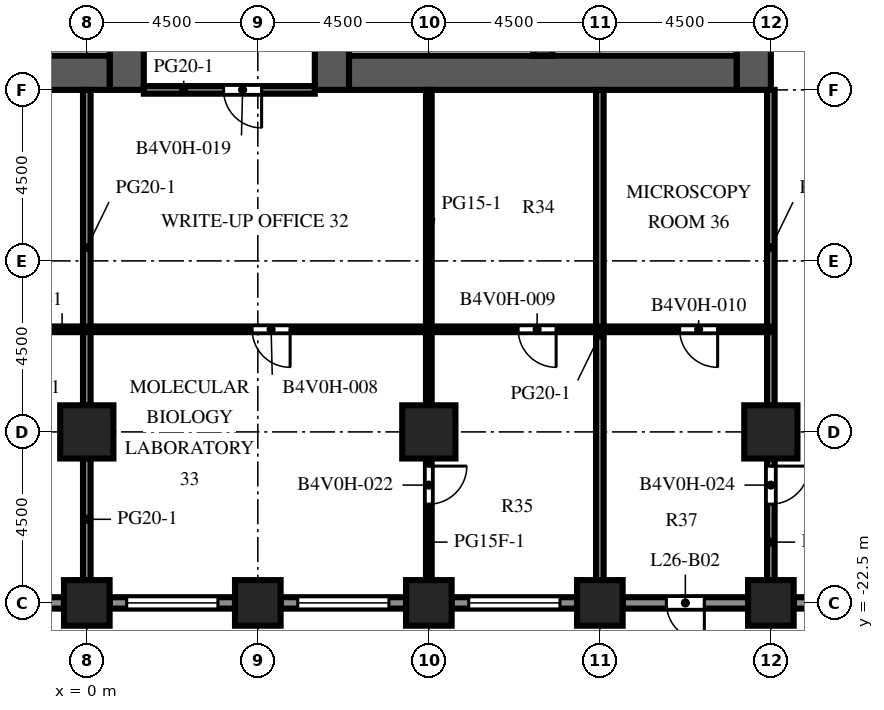
"""IFC4 building model, lengths in metres.
Left out: names, types, materials, properties, quantities, classifications, styles, units other than length and angle.
Written with IfcOpenShell. Run it as: python <this file> out.ifc"""

import sys

from ifc_helpers import new_model, si_unit, direction, frame, frame_2d, origin, origin_2d, place, context, subcontext, project, spatial, rectangle, extrude, element, fill, save


model = new_model("IFC4")
c1 = context("Model", 3, precision=1e-05, world=origin(), true_north=direction((0.0, 1.0)))
c2 = subcontext(c1, "Body", "Model", "MODEL_VIEW")
j1 = project(units=[si_unit("LENGTHUNIT", "METRE"), si_unit("PLANEANGLEUNIT", "RADIAN")], contexts=[c1])
p1 = place(None, origin())
s1 = spatial("IfcSite", under=j1, at=p1, CompositionType="ELEMENT")
p2 = place(p1, origin())
s2 = spatial("IfcBuilding", under=s1, at=p2, CompositionType="ELEMENT")
p3 = place(p2, frame((0.0, 0.0, 116.7)))
s3 = spatial("IfcBuildingStorey", under=s2, at=p3, CompositionType="ELEMENT", Elevation=116.7)
for number, where, z_axis, x_axis in (
    (1, (0.0, -22.5, 0.0), (0.0, 0.0, 1.0), (1.0, 0.0, 0.0)),
    (2, (4.5, -22.5, 0.0), (0.0, 0.0, 1.0), (1.0, 0.0, 0.0)),
    (3, (9.0, -22.5, 0.0), (0.0, 0.0, 1.0), (1.0, 0.0, 0.0)),
    (4, (13.5, -22.5, 0.0), (0.0, 0.0, 1.0), (1.0, 0.0, 0.0)),
    (5, (18.0, -22.5, 0.0), (0.0, 0.0, 1.0), (1.0, 0.0, 0.0)),
):
    element("IfcColumn", number, at=place(p3, frame(where, z_axis=z_axis, x_axis=x_axis)), inside=s3, PredefinedType="COLUMN", context=c2, shape_type="SweptSolid", body=[
        extrude(rectangle(XDim=1.2, YDim=1.2, at=origin_2d()), origin(), (0.0, 0.0, 1.0), 4.1),
    ])
for number, where, z_axis, x_axis in (
    (6, (0.0, -18.0, 0.0), (0.0, 0.0, 1.0), (1.0, 0.0, 0.0)),
    (7, (9.0, -18.0, 0.0), (0.0, 0.0, 1.0), (1.0, 0.0, 0.0)),
    (8, (18.0, -18.0, 0.0), (0.0, 0.0, 1.0), (1.0, 0.0, 0.0)),
):
    element("IfcColumn", number, at=place(p3, frame(where, z_axis=z_axis, x_axis=x_axis)), inside=s3, PredefinedType="COLUMN", context=c2, shape_type="SweptSolid", body=[
        extrude(rectangle(XDim=1.4, YDim=1.4, at=origin_2d()), origin(), (0.0, 0.0, 1.0), 4.1),
    ])
p4 = place(p3, frame((1.05, -9.0, 0.0), z_axis=(0.0, 0.0, 1.0), x_axis=(0.0, 1.0, 0.0)))
e9 = element("IfcWall", 9, at=p4, inside=s3, PredefinedType="SHEAR", context=c2, shape_type="SweptSolid", body=[
    extrude(rectangle(XDim=27.5, YDim=0.9, at=frame_2d((13.75, 0.0))), origin(), (0.0, 0.0, 1.0), 4.1),
])
p5 = place(p4, frame((12.55, 0.0, 0.0)))
e10 = element("IfcOpeningElement", 10, at=p5, cuts=e9, PredefinedType="OPENING", context=c2, shape_type="SweptSolid", body=[
    extrude(rectangle(XDim=2.4, YDim=2.4, at=frame_2d((1.2, 1.2))), frame((0.0, 0.46, 0.0), z_axis=(0.0, -1.0, 0.0), x_axis=(1.0, 0.0, 0.0)), (0.0, 0.0, 1.0), 0.92),
])
p6 = place(p4, frame((3.975, 0.0, 0.0)))
e11 = element("IfcOpeningElement", 11, at=p6, cuts=e9, PredefinedType="OPENING", context=c2, shape_type="SweptSolid", body=[
    extrude(rectangle(XDim=1.2, YDim=2.1, at=frame_2d((0.6, 1.05))), frame((0.0, 0.46, 0.0), z_axis=(0.0, -1.0, 0.0), x_axis=(1.0, 0.0, 0.0)), (0.0, 0.0, 1.0), 0.92),
])
p7 = place(p4, frame((19.485, 0.0, 0.0)))
e12 = element("IfcOpeningElement", 12, at=p7, cuts=e9, PredefinedType="OPENING", context=c2, shape_type="SweptSolid", body=[
    extrude(rectangle(XDim=1.0, YDim=2.1, at=frame_2d((0.5, 1.05))), frame((0.0, 0.46, 0.0), z_axis=(0.0, -1.0, 0.0), x_axis=(1.0, 0.0, 0.0)), (0.0, 0.0, 1.0), 0.92),
])
p8 = place(p4, frame((21.139, 0.0, 0.0)))
e13 = element("IfcOpeningElement", 13, at=p8, cuts=e9, PredefinedType="OPENING", context=c2, shape_type="SweptSolid", body=[
    extrude(rectangle(XDim=1.0, YDim=2.1, at=frame_2d((0.5, 1.05))), frame((0.0, 0.46, 0.0), z_axis=(0.0, -1.0, 0.0), x_axis=(1.0, 0.0, 0.0)), (0.0, 0.0, 1.0), 0.92),
])
p9 = place(p4, frame((23.16, 0.0, 0.0)))
e14 = element("IfcOpeningElement", 14, at=p9, cuts=e9, PredefinedType="OPENING", context=c2, shape_type="SweptSolid", body=[
    extrude(rectangle(XDim=1.0, YDim=2.1, at=frame_2d((0.5, 1.05))), frame((0.0, 0.46, 0.0), z_axis=(0.0, -1.0, 0.0), x_axis=(1.0, 0.0, 0.0)), (0.0, 0.0, 1.0), 0.92),
])
p10 = place(p4, frame((25.181, 0.0, 0.0)))
e15 = element("IfcOpeningElement", 15, at=p10, cuts=e9, PredefinedType="OPENING", context=c2, shape_type="SweptSolid", body=[
    extrude(rectangle(XDim=1.0, YDim=2.1, at=frame_2d((0.5, 1.05))), frame((0.0, 0.46, 0.0), z_axis=(0.0, -1.0, 0.0), x_axis=(1.0, 0.0, 0.0)), (0.0, 0.0, 1.0), 0.92),
])
p11 = place(p3, frame((-9.6, -8.55, 0.0), z_axis=(0.0, 0.0, 1.0), x_axis=(1.0, 0.0, 0.0)))
e16 = element("IfcWall", 16, at=p11, inside=s3, PredefinedType="SHEAR", context=c2, shape_type="SweptSolid", body=[
    extrude(rectangle(XDim=10.2, YDim=0.9, at=frame_2d((5.1, 0.0))), origin(), (0.0, 0.0, 1.0), 4.1),
])
p12 = place(p3, frame((6.45, -9.0, 0.0), z_axis=(0.0, 0.0, 1.0), x_axis=(0.0, 1.0, 0.0)))
e17 = element("IfcWall", 17, at=p12, inside=s3, PredefinedType="SHEAR", context=c2, shape_type="SweptSolid", body=[
    extrude(rectangle(XDim=27.5, YDim=0.9, at=frame_2d((13.75, 0.0))), origin(), (0.0, 0.0, 1.0), 4.1),
])
p13 = place(p12, frame((12.55, 0.0, 0.0)))
e18 = element("IfcOpeningElement", 18, at=p13, cuts=e17, PredefinedType="OPENING", context=c2, shape_type="SweptSolid", body=[
    extrude(rectangle(XDim=2.4, YDim=2.4, at=frame_2d((1.2, 1.2))), frame((0.0, 0.46, 0.0), z_axis=(0.0, -1.0, 0.0), x_axis=(1.0, 0.0, 0.0)), (0.0, 0.0, 1.0), 0.92),
])
p14 = place(p12, frame((3.975, 0.0, 0.0)))
e19 = element("IfcOpeningElement", 19, at=p14, cuts=e17, PredefinedType="OPENING", context=c2, shape_type="SweptSolid", body=[
    extrude(rectangle(XDim=1.2, YDim=2.1, at=frame_2d((0.6, 1.05))), frame((0.0, 0.46, 0.0), z_axis=(0.0, -1.0, 0.0), x_axis=(1.0, 0.0, 0.0)), (0.0, 0.0, 1.0), 0.92),
])
p15 = place(p12, frame((19.485, 0.0, 0.0)))
e20 = element("IfcOpeningElement", 20, at=p15, cuts=e17, PredefinedType="OPENING", context=c2, shape_type="SweptSolid", body=[
    extrude(rectangle(XDim=1.0, YDim=2.1, at=frame_2d((0.5, 1.05))), frame((0.0, 0.46, 0.0), z_axis=(0.0, -1.0, 0.0), x_axis=(1.0, 0.0, 0.0)), (0.0, 0.0, 1.0), 0.92),
])
p16 = place(p12, frame((21.139, 0.0, 0.0)))
e21 = element("IfcOpeningElement", 21, at=p16, cuts=e17, PredefinedType="OPENING", context=c2, shape_type="SweptSolid", body=[
    extrude(rectangle(XDim=1.0, YDim=2.1, at=frame_2d((0.5, 1.05))), frame((0.0, 0.46, 0.0), z_axis=(0.0, -1.0, 0.0), x_axis=(1.0, 0.0, 0.0)), (0.0, 0.0, 1.0), 0.92),
])
p17 = place(p12, frame((23.16, 0.0, 0.0)))
e22 = element("IfcOpeningElement", 22, at=p17, cuts=e17, PredefinedType="OPENING", context=c2, shape_type="SweptSolid", body=[
    extrude(rectangle(XDim=1.0, YDim=2.1, at=frame_2d((0.5, 1.05))), frame((0.0, 0.46, 0.0), z_axis=(0.0, -1.0, 0.0), x_axis=(1.0, 0.0, 0.0)), (0.0, 0.0, 1.0), 0.92),
])
p18 = place(p12, frame((25.181, 0.0, 0.0)))
e23 = element("IfcOpeningElement", 23, at=p18, cuts=e17, PredefinedType="OPENING", context=c2, shape_type="SweptSolid", body=[
    extrude(rectangle(XDim=1.0, YDim=2.1, at=frame_2d((0.5, 1.05))), frame((0.0, 0.46, 0.0), z_axis=(0.0, -1.0, 0.0), x_axis=(1.0, 0.0, 0.0)), (0.0, 0.0, 1.0), 0.92),
])
p19 = place(p3, frame((17.55, -9.0, 0.0), z_axis=(0.0, 0.0, 1.0), x_axis=(0.0, 1.0, 0.0)))
e24 = element("IfcWall", 24, at=p19, inside=s3, PredefinedType="SHEAR", context=c2, shape_type="SweptSolid", body=[
    extrude(rectangle(XDim=27.5, YDim=0.9, at=frame_2d((13.75, 0.0))), origin(), (0.0, 0.0, 1.0), 4.1),
])
p20 = place(p19, frame((12.55, 0.0, 0.0)))
e25 = element("IfcOpeningElement", 25, at=p20, cuts=e24, PredefinedType="OPENING", context=c2, shape_type="SweptSolid", body=[
    extrude(rectangle(XDim=2.4, YDim=2.4, at=frame_2d((1.2, 1.2))), frame((0.0, 0.46, 0.0), z_axis=(0.0, -1.0, 0.0), x_axis=(1.0, 0.0, 0.0)), (0.0, 0.0, 1.0), 0.92),
])
p21 = place(p19, frame((6.825, 0.0, 0.0)))
e26 = element("IfcOpeningElement", 26, at=p21, cuts=e24, PredefinedType="OPENING", context=c2, shape_type="SweptSolid", body=[
    extrude(rectangle(XDim=1.2, YDim=2.1, at=frame_2d((0.6, 1.05))), frame((0.0, 0.46, 0.0), z_axis=(0.0, -1.0, 0.0), x_axis=(1.0, 0.0, 0.0)), (0.0, 0.0, 1.0), 0.92),
])
p22 = place(p19, frame((19.475, 0.0, 0.0)))
e27 = element("IfcOpeningElement", 27, at=p22, cuts=e24, PredefinedType="OPENING", context=c2, shape_type="SweptSolid", body=[
    extrude(rectangle(XDim=1.2, YDim=2.1, at=frame_2d((0.6, 1.05))), frame((0.0, 0.46, 0.0), z_axis=(0.0, -1.0, 0.0), x_axis=(1.0, 0.0, 0.0)), (0.0, 0.0, 1.0), 0.92),
])
p23 = place(p3, frame((6.9, -8.55, 0.0), z_axis=(0.0, 0.0, 1.0), x_axis=(1.0, 0.0, 0.0)))
e28 = element("IfcWall", 28, at=p23, inside=s3, PredefinedType="SHEAR", context=c2, shape_type="SweptSolid", body=[
    extrude(rectangle(XDim=10.2, YDim=0.9, at=frame_2d((5.1, 0.0))), origin(), (0.0, 0.0, 1.0), 4.1),
])
p24 = place(p3, frame((12.0, -8.1, 0.0), z_axis=(0.0, 0.0, 1.0), x_axis=(0.0, 1.0, 0.0)))
e29 = element("IfcWall", 29, at=p24, inside=s3, PredefinedType="SHEAR", context=c2, shape_type="SweptSolid", body=[
    extrude(rectangle(XDim=7.35, YDim=0.5, at=frame_2d((3.675, 0.0))), origin(), (0.0, 0.0, 1.0), 4.1),
])
p25 = place(p3, frame((-0.6, -22.5, 0.0), z_axis=(0.0, 0.0, 1.0), x_axis=(-1.0, 0.0, 0.0)))
e30 = element("IfcWall", 30, at=p25, inside=s3, PredefinedType="SOLIDWALL", context=c2, shape_type="SweptSolid", body=[
    extrude(rectangle(XDim=3.3, YDim=0.3, at=frame_2d((1.65, 0.0))), origin(), (0.0, 0.0, 1.0), 2.75),
])
p26 = place(p25, frame((0.45, 0.0, 0.8)))
e31 = element("IfcOpeningElement", 31, at=p26, cuts=e30, PredefinedType="OPENING", context=c2, shape_type="SweptSolid", body=[
    extrude(rectangle(XDim=2.4, YDim=1.7, at=frame_2d((1.2, 0.85))), frame((0.0, 0.16, 0.0), z_axis=(0.0, -1.0, 0.0), x_axis=(1.0, 0.0, 0.0)), (0.0, 0.0, 1.0), 0.32),
])
p27 = place(p3, frame((3.9, -22.5, 0.0), z_axis=(0.0, 0.0, 1.0), x_axis=(-1.0, 0.0, 0.0)))
e32 = element("IfcWall", 32, at=p27, inside=s3, PredefinedType="SOLIDWALL", context=c2, shape_type="SweptSolid", body=[
    extrude(rectangle(XDim=3.3, YDim=0.3, at=frame_2d((1.65, 0.0))), origin(), (0.0, 0.0, 1.0), 2.75),
])
p28 = place(p27, frame((0.45, 0.0, 0.8)))
e33 = element("IfcOpeningElement", 33, at=p28, cuts=e32, PredefinedType="OPENING", context=c2, shape_type="SweptSolid", body=[
    extrude(rectangle(XDim=2.4, YDim=1.7, at=frame_2d((1.2, 0.85))), frame((0.0, 0.16, 0.0), z_axis=(0.0, -1.0, 0.0), x_axis=(1.0, 0.0, 0.0)), (0.0, 0.0, 1.0), 0.32),
])
p29 = place(p3, frame((8.4, -22.5, 0.0), z_axis=(0.0, 0.0, 1.0), x_axis=(-1.0, 0.0, 0.0)))
e34 = element("IfcWall", 34, at=p29, inside=s3, PredefinedType="SOLIDWALL", context=c2, shape_type="SweptSolid", body=[
    extrude(rectangle(XDim=3.3, YDim=0.3, at=frame_2d((1.65, 0.0))), origin(), (0.0, 0.0, 1.0), 2.75),
])
p30 = place(p29, frame((0.45, 0.0, 0.8)))
e35 = element("IfcOpeningElement", 35, at=p30, cuts=e34, PredefinedType="OPENING", context=c2, shape_type="SweptSolid", body=[
    extrude(rectangle(XDim=2.4, YDim=1.7, at=frame_2d((1.2, 0.85))), frame((0.0, 0.16, 0.0), z_axis=(0.0, -1.0, 0.0), x_axis=(1.0, 0.0, 0.0)), (0.0, 0.0, 1.0), 0.32),
])
p31 = place(p3, frame((12.9, -22.5, 0.0), z_axis=(0.0, 0.0, 1.0), x_axis=(-1.0, 0.0, 0.0)))
e36 = element("IfcWall", 36, at=p31, inside=s3, PredefinedType="SOLIDWALL", context=c2, shape_type="SweptSolid", body=[
    extrude(rectangle(XDim=3.3, YDim=0.3, at=frame_2d((1.65, 0.0))), origin(), (0.0, 0.0, 1.0), 2.75),
])
p32 = place(p31, frame((0.45, 0.0, 0.8)))
e37 = element("IfcOpeningElement", 37, at=p32, cuts=e36, PredefinedType="OPENING", context=c2, shape_type="SweptSolid", body=[
    extrude(rectangle(XDim=2.4, YDim=1.7, at=frame_2d((1.2, 0.85))), frame((0.0, 0.16, 0.0), z_axis=(0.0, -1.0, 0.0), x_axis=(1.0, 0.0, 0.0)), (0.0, 0.0, 1.0), 0.32),
])
p33 = place(p3, frame((17.4, -22.5, 0.0), z_axis=(0.0, 0.0, 1.0), x_axis=(-1.0, 0.0, 0.0)))
e38 = element("IfcWall", 38, at=p33, inside=s3, PredefinedType="SOLIDWALL", context=c2, shape_type="SweptSolid", body=[
    extrude(rectangle(XDim=3.3, YDim=0.3, at=frame_2d((1.65, 0.0))), origin(), (0.0, 0.0, 1.0), 2.75),
])
p34 = place(p33, frame((1.15, 0.0, 0.0)))
e39 = element("IfcOpeningElement", 39, at=p34, cuts=e38, PredefinedType="OPENING", context=c2, shape_type="SweptSolid", body=[
    extrude(rectangle(XDim=1.0, YDim=2.2, at=frame_2d((0.5, 1.1))), frame((0.0, 0.16, 0.0), z_axis=(0.0, -1.0, 0.0), x_axis=(1.0, 0.0, 0.0)), (0.0, 0.0, 1.0), 0.32),
])
p35 = place(p3, frame((21.9, -22.5, 0.0), z_axis=(0.0, 0.0, 1.0), x_axis=(-1.0, 0.0, 0.0)))
e40 = element("IfcWall", 40, at=p35, inside=s3, PredefinedType="SOLIDWALL", context=c2, shape_type="SweptSolid", body=[
    extrude(rectangle(XDim=3.3, YDim=0.3, at=frame_2d((1.65, 0.0))), origin(), (0.0, 0.0, 1.0), 2.75),
])
p36 = place(p35, frame((1.575, 0.0, 0.8)))
e41 = element("IfcOpeningElement", 41, at=p36, cuts=e40, PredefinedType="OPENING", context=c2, shape_type="SweptSolid", body=[
    extrude(rectangle(XDim=1.2, YDim=1.7, at=frame_2d((0.6, 0.85))), frame((0.0, 0.16, 0.0), z_axis=(0.0, -1.0, 0.0), x_axis=(1.0, 0.0, 0.0)), (0.0, 0.0, 1.0), 0.32),
])
p37 = place(p3, frame((0.0, -21.9, 0.0), z_axis=(0.0, 0.0, 1.0), x_axis=(0.0, 1.0, 0.0)))
e42 = element("IfcWall", 42, at=p37, inside=s3, PredefinedType="PARTITIONING", context=c2, shape_type="SweptSolid", body=[
    extrude(rectangle(XDim=3.2, YDim=0.2, at=frame_2d((1.6, 0.0))), origin(), (0.0, 0.0, 1.0), 3.65),
])
p38 = place(p3, frame((0.0, -17.3, 0.0), z_axis=(0.0, 0.0, 1.0), x_axis=(0.0, 1.0, 0.0)))
e43 = element("IfcWall", 43, at=p38, inside=s3, PredefinedType="PARTITIONING", context=c2, shape_type="SweptSolid", body=[
    extrude(rectangle(XDim=8.3, YDim=0.2, at=frame_2d((4.15, 0.0))), origin(), (0.0, 0.0, 1.0), 3.65),
])
p39 = place(p3, frame((9.0, -18.7, 0.0), z_axis=(0.0, 0.0, 1.0), x_axis=(0.0, -1.0, 0.0)))
e44 = element("IfcWall", 44, at=p39, inside=s3, PredefinedType="PARTITIONING", context=c2, shape_type="SweptSolid", body=[
    extrude(rectangle(XDim=3.2, YDim=0.15, at=frame_2d((1.6, 0.0))), origin(), (0.0, 0.0, 1.0), 3.65),
])
p40 = place(p39, frame((0.2, 0.0, 0.0)))
e45 = element("IfcOpeningElement", 45, at=p40, cuts=e44, PredefinedType="OPENING", context=c2, shape_type="SweptSolid", body=[
    extrude(rectangle(XDim=1.0, YDim=2.1, at=frame_2d((0.5, 1.05))), frame((0.0, 0.085, 0.0), z_axis=(0.0, -1.0, 0.0), x_axis=(1.0, 0.0, 0.0)), (0.0, 0.0, 1.0), 0.17),
])
p41 = place(p3, frame((9.0, -17.3, 0.0), z_axis=(0.0, 0.0, 1.0), x_axis=(0.0, 1.0, 0.0)))
e46 = element("IfcWall", 46, at=p41, inside=s3, PredefinedType="PARTITIONING", context=c2, shape_type="SweptSolid", body=[
    extrude(rectangle(XDim=8.3, YDim=0.15, at=frame_2d((4.15, 0.0))), origin(), (0.0, 0.0, 1.0), 3.65),
])
p42 = place(p3, frame((13.5, -21.9, 0.0), z_axis=(0.0, 0.0, 1.0), x_axis=(0.0, 1.0, 0.0)))
e47 = element("IfcWall", 47, at=p42, inside=s3, PredefinedType="PARTITIONING", context=c2, shape_type="SweptSolid", body=[
    extrude(rectangle(XDim=12.9, YDim=0.2, at=frame_2d((6.45, 0.0))), origin(), (0.0, 0.0, 1.0), 3.65),
])
p43 = place(p3, frame((18.0, -21.9, 0.0), z_axis=(0.0, 0.0, 1.0), x_axis=(0.0, 1.0, 0.0)))
e48 = element("IfcWall", 48, at=p43, inside=s3, PredefinedType="PARTITIONING", context=c2, shape_type="SweptSolid", body=[
    extrude(rectangle(XDim=3.2, YDim=0.2, at=frame_2d((1.6, 0.0))), origin(), (0.0, 0.0, 1.0), 3.65),
])
p44 = place(p43, frame((2.0, 0.0, 0.0)))
e49 = element("IfcOpeningElement", 49, at=p44, cuts=e48, PredefinedType="OPENING", context=c2, shape_type="SweptSolid", body=[
    extrude(rectangle(XDim=1.0, YDim=2.1, at=frame_2d((0.5, 1.05))), frame((0.0, 0.11, 0.0), z_axis=(0.0, -1.0, 0.0), x_axis=(1.0, 0.0, 0.0)), (0.0, 0.0, 1.0), 0.22),
])
p45 = place(p3, frame((18.0, -17.3, 0.0), z_axis=(0.0, 0.0, 1.0), x_axis=(0.0, 1.0, 0.0)))
e50 = element("IfcWall", 50, at=p45, inside=s3, PredefinedType="PARTITIONING", context=c2, shape_type="SweptSolid", body=[
    extrude(rectangle(XDim=8.3, YDim=0.2, at=frame_2d((4.15, 0.0))), origin(), (0.0, 0.0, 1.0), 3.65),
])
p46 = place(p3, frame((-10.5, -15.3, 0.0), z_axis=(0.0, 0.0, 1.0), x_axis=(1.0, 0.0, 0.0)))
e51 = element("IfcWall", 51, at=p46, inside=s3, PredefinedType="PARTITIONING", context=c2, shape_type="SweptSolid", body=[
    extrude(rectangle(XDim=28.5, YDim=0.15, at=frame_2d((14.25, 0.0))), origin(), (0.0, 0.0, 1.0), 3.65),
])
p47 = place(p46, frame((3.85, 0.0, 0.0)))
e52 = element("IfcOpeningElement", 52, at=p47, cuts=e51, PredefinedType="OPENING", context=c2, shape_type="SweptSolid", body=[
    extrude(rectangle(XDim=1.0, YDim=2.1, at=frame_2d((0.5, 1.05))), frame((0.0, 0.085, 0.0), z_axis=(0.0, -1.0, 0.0), x_axis=(1.0, 0.0, 0.0)), (0.0, 0.0, 1.0), 0.17),
])
p48 = place(p46, frame((14.85, 0.0, 0.0)))
e53 = element("IfcOpeningElement", 53, at=p48, cuts=e51, PredefinedType="OPENING", context=c2, shape_type="SweptSolid", body=[
    extrude(rectangle(XDim=1.0, YDim=2.1, at=frame_2d((0.5, 1.05))), frame((0.0, 0.085, 0.0), z_axis=(0.0, -1.0, 0.0), x_axis=(1.0, 0.0, 0.0)), (0.0, 0.0, 1.0), 0.17),
])
p49 = place(p46, frame((21.85, 0.0, 0.0)))
e54 = element("IfcOpeningElement", 54, at=p49, cuts=e51, PredefinedType="OPENING", context=c2, shape_type="SweptSolid", body=[
    extrude(rectangle(XDim=1.0, YDim=2.1, at=frame_2d((0.5, 1.05))), frame((0.0, 0.085, 0.0), z_axis=(0.0, -1.0, 0.0), x_axis=(1.0, 0.0, 0.0)), (0.0, 0.0, 1.0), 0.17),
])
p50 = place(p46, frame((26.1, 0.0, 0.0)))
e55 = element("IfcOpeningElement", 55, at=p50, cuts=e51, PredefinedType="OPENING", context=c2, shape_type="SweptSolid", body=[
    extrude(rectangle(XDim=1.0, YDim=2.1, at=frame_2d((0.5, 1.05))), frame((0.0, 0.085, 0.0), z_axis=(0.0, -1.0, 0.0), x_axis=(1.0, 0.0, 0.0)), (0.0, 0.0, 1.0), 0.17),
])
p51 = place(p3, frame((6.0, -9.0, 0.0), z_axis=(0.0, 0.0, 1.0), x_axis=(-1.0, 0.0, 0.0)))
e56 = element("IfcWall", 56, at=p51, inside=s3, PredefinedType="PARTITIONING", context=c2, shape_type="SweptSolid", body=[
    extrude(rectangle(XDim=4.5, YDim=0.2, at=frame_2d((2.25, 0.0))), origin(), (0.0, 0.0, 1.0), 3.65),
])
p52 = place(p51, frame((1.4, 0.0, 0.0)))
e57 = element("IfcOpeningElement", 57, at=p52, cuts=e56, PredefinedType="OPENING", context=c2, shape_type="SweptSolid", body=[
    extrude(rectangle(XDim=1.0, YDim=2.1, at=frame_2d((0.5, 1.05))), frame((0.0, 0.11, 0.0), z_axis=(0.0, -1.0, 0.0), x_axis=(1.0, 0.0, 0.0)), (0.0, 0.0, 1.0), 0.22),
])
p53 = place(p28, origin())
e58 = element("IfcWindow", 58, at=p53, inside=s3, PartitioningType="SINGLE_PANEL", PredefinedType="WINDOW", context=c2, shape_type="SweptSolid", body=[
    extrude(rectangle(XDim=2.4, YDim=1.7, at=frame_2d((1.2, 0.85))), frame((0.0, 0.03, 0.0), z_axis=(0.0, -1.0, 0.0), x_axis=(1.0, 0.0, 0.0)), (0.0, 0.0, 1.0), 0.06),
])
fill(e33, e58)
p54 = place(p30, origin())
e59 = element("IfcWindow", 59, at=p54, inside=s3, PartitioningType="SINGLE_PANEL", PredefinedType="WINDOW", context=c2, shape_type="SweptSolid", body=[
    extrude(rectangle(XDim=2.4, YDim=1.7, at=frame_2d((1.2, 0.85))), frame((0.0, 0.03, 0.0), z_axis=(0.0, -1.0, 0.0), x_axis=(1.0, 0.0, 0.0)), (0.0, 0.0, 1.0), 0.06),
])
fill(e35, e59)
p55 = place(p32, origin())
e60 = element("IfcWindow", 60, at=p55, inside=s3, PartitioningType="SINGLE_PANEL", PredefinedType="WINDOW", context=c2, shape_type="SweptSolid", body=[
    extrude(rectangle(XDim=2.4, YDim=1.7, at=frame_2d((1.2, 0.85))), frame((0.0, 0.03, 0.0), z_axis=(0.0, -1.0, 0.0), x_axis=(1.0, 0.0, 0.0)), (0.0, 0.0, 1.0), 0.06),
])
fill(e37, e60)
p56 = place(p34, origin())
e61 = element("IfcDoor", 61, at=p56, inside=s3, OperationType="SINGLE_SWING_LEFT", PredefinedType="DOOR", context=c2, shape_type="SweptSolid", body=[
    extrude(rectangle(XDim=1.0, YDim=2.2, at=frame_2d((0.5, 1.1))), frame((0.0, 0.025, 0.0), z_axis=(0.0, -1.0, 0.0), x_axis=(1.0, 0.0, 0.0)), (0.0, 0.0, 1.0), 0.05),
])
fill(e39, e61)
p57 = place(p48, origin())
e62 = element("IfcDoor", 62, at=p57, inside=s3, OperationType="SINGLE_SWING_RIGHT", PredefinedType="DOOR", context=c2, shape_type="SweptSolid", body=[
    extrude(rectangle(XDim=1.0, YDim=2.1, at=frame_2d((0.5, 1.05))), frame((0.0, 0.025, 0.0), z_axis=(0.0, -1.0, 0.0), x_axis=(1.0, 0.0, 0.0)), (0.0, 0.0, 1.0), 0.05),
])
fill(e53, e62)
p58 = place(p49, origin())
e63 = element("IfcDoor", 63, at=p58, inside=s3, OperationType="SINGLE_SWING_RIGHT", PredefinedType="DOOR", context=c2, shape_type="SweptSolid", body=[
    extrude(rectangle(XDim=1.0, YDim=2.1, at=frame_2d((0.5, 1.05))), frame((0.0, 0.025, 0.0), z_axis=(0.0, -1.0, 0.0), x_axis=(1.0, 0.0, 0.0)), (0.0, 0.0, 1.0), 0.05),
])
fill(e54, e63)
p59 = place(p50, origin())
e64 = element("IfcDoor", 64, at=p59, inside=s3, OperationType="SINGLE_SWING_RIGHT", PredefinedType="DOOR", context=c2, shape_type="SweptSolid", body=[
    extrude(rectangle(XDim=1.0, YDim=2.1, at=frame_2d((0.5, 1.05))), frame((0.0, 0.025, 0.0), z_axis=(0.0, -1.0, 0.0), x_axis=(1.0, 0.0, 0.0)), (0.0, 0.0, 1.0), 0.05),
])
fill(e55, e64)
p60 = place(p52, origin())
e65 = element("IfcDoor", 65, at=p60, inside=s3, OperationType="SINGLE_SWING_LEFT", PredefinedType="DOOR", context=c2, shape_type="SweptSolid", body=[
    extrude(rectangle(XDim=1.0, YDim=2.1, at=frame_2d((0.5, 1.05))), frame((0.0, 0.025, 0.0), z_axis=(0.0, -1.0, 0.0), x_axis=(1.0, 0.0, 0.0)), (0.0, 0.0, 1.0), 0.05),
])
fill(e57, e65)
p61 = place(p40, origin())
e66 = element("IfcDoor", 66, at=p61, inside=s3, OperationType="SINGLE_SWING_LEFT", PredefinedType="DOOR", context=c2, shape_type="SweptSolid", body=[
    extrude(rectangle(XDim=1.0, YDim=2.1, at=frame_2d((0.5, 1.05))), frame((0.0, 0.025, 0.0), z_axis=(0.0, -1.0, 0.0), x_axis=(1.0, 0.0, 0.0)), (0.0, 0.0, 1.0), 0.05),
])
fill(e45, e66)
p62 = place(p44, origin())
e67 = element("IfcDoor", 67, at=p62, inside=s3, OperationType="SINGLE_SWING_RIGHT", PredefinedType="DOOR", context=c2, shape_type="SweptSolid", body=[
    extrude(rectangle(XDim=1.0, YDim=2.1, at=frame_2d((0.5, 1.05))), frame((0.0, 0.025, 0.0), z_axis=(0.0, -1.0, 0.0), x_axis=(1.0, 0.0, 0.0)), (0.0, 0.0, 1.0), 0.05),
])
fill(e49, e67)
save(model, sys.argv[1])
